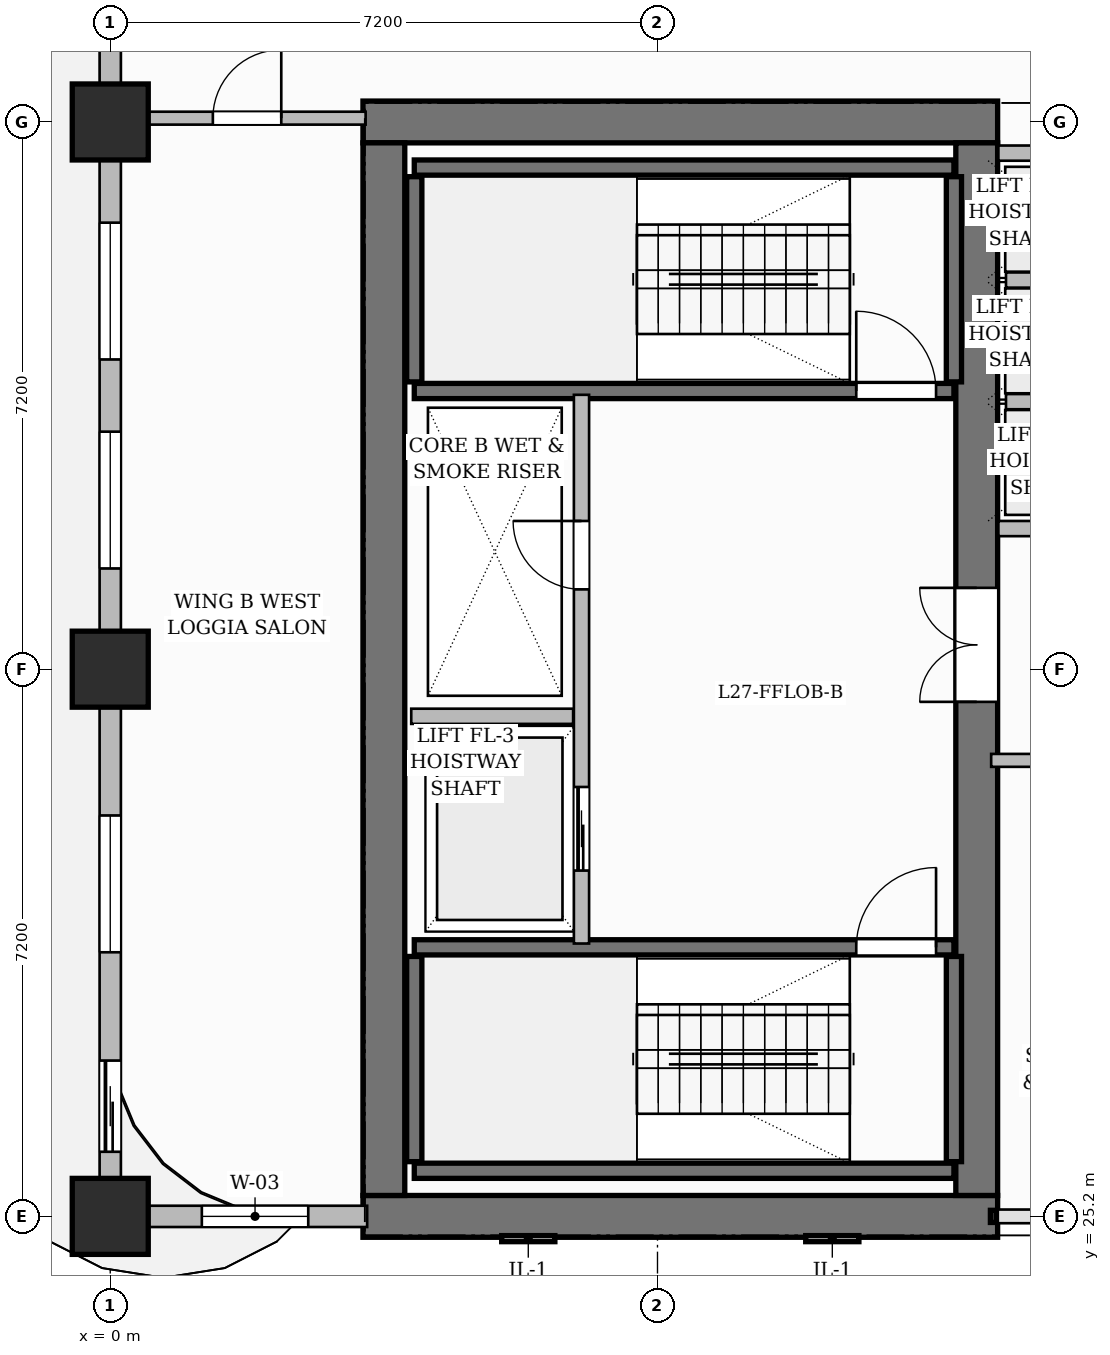
"""IFC4 building model, lengths in metres.
Left out: names, types, materials, properties, quantities, classifications, styles, units other than length and angle.
Written with IfcOpenShell. Run it as: python <this file> out.ifc"""

import sys

from ifc_helpers import new_model, si_unit, direction, frame, frame_2d, origin, origin_2d, place, context, subcontext, project, spatial, rectangle, extrude, source, transform, mapped, element, fill, save


model = new_model("IFC4")
c1 = context("Model", 3, precision=1e-05, world=origin(), true_north=direction((0.0, 1.0)))
c2 = subcontext(c1, "Body", "Model", "MODEL_VIEW")
j1 = project(units=[si_unit("LENGTHUNIT", "METRE"), si_unit("PLANEANGLEUNIT", "RADIAN")], contexts=[c1])
p1 = place(None, origin())
s1 = spatial("IfcSite", under=j1, at=p1, CompositionType="ELEMENT")
p2 = place(p1, origin())
s2 = spatial("IfcBuilding", under=s1, at=p2, CompositionType="ELEMENT")
p3 = place(p2, frame((0.0, 0.0, 111.8)))
s3 = spatial("IfcBuildingStorey", under=s2, at=p3, CompositionType="ELEMENT", Elevation=111.8)
for number, where, z_axis, x_axis in (
    (1, (3.325, 25.2, 0.0), (0.0, 0.0, 1.0), (1.0, 0.0, 0.0)),
    (2, (3.325, 39.6, 0.0), (0.0, 0.0, 1.0), (1.0, 0.0, 0.0)),
):
    element("IfcWall", number, at=place(p3, frame(where, z_axis=z_axis, x_axis=x_axis)), inside=s3, PredefinedType="SHEAR", context=c2, shape_type="SweptSolid", body=[
        extrude(rectangle(XDim=8.35, YDim=0.55, at=frame_2d((4.175, 0.0))), origin(), (0.0, 0.0, 1.0), 3.7),
    ])
p4 = place(p3, frame((3.6, 25.475, 0.0), z_axis=(0.0, 0.0, 1.0), x_axis=(0.0, 1.0, 0.0)))
e3 = element("IfcWall", 3, at=p4, inside=s3, PredefinedType="SHEAR", context=c2, shape_type="SweptSolid", body=[
    extrude(rectangle(XDim=13.85, YDim=0.55, at=frame_2d((6.925, 0.0))), origin(), (0.0, 0.0, 1.0), 3.7),
])
p5 = place(p3, frame((11.4, 25.475, 0.0), z_axis=(0.0, 0.0, 1.0), x_axis=(0.0, 1.0, 0.0)))
e4 = element("IfcWall", 4, at=p5, inside=s3, PredefinedType="SHEAR", context=c2, shape_type="SweptSolid", body=[
    extrude(rectangle(XDim=13.85, YDim=0.55, at=frame_2d((6.925, 0.0))), origin(), (0.0, 0.0, 1.0), 3.7),
])
p6 = place(p5, frame((6.495, 0.0, 0.0)))
e5 = element("IfcOpeningElement", 5, at=p6, cuts=e4, PredefinedType="OPENING", context=c2, shape_type="SweptSolid", body=[
    extrude(rectangle(XDim=1.5, YDim=2.2, at=frame_2d((0.75, 1.1))), frame((0.0, 0.285, 0.0), z_axis=(0.0, -1.0, 0.0), x_axis=(1.0, 0.0, 0.0)), (0.0, 0.0, 1.0), 0.57),
])
m1 = source(origin(), c2, "Body", "SweptSolid", [
    extrude(rectangle(XDim=1.0, YDim=1.0, at=origin_2d()), origin(), (0.0, 0.0, 1.0), 3.7),
])
for number, where, z_axis, x_axis in (
    (6, (0.0, 25.2, 0.0), (0.0, 0.0, 1.0), (1.0, 0.0, 0.0)),
    (7, (0.0, 32.4, 0.0), (0.0, 0.0, 1.0), (1.0, 0.0, 0.0)),
    (8, (0.0, 39.6, 0.0), (0.0, 0.0, 1.0), (1.0, 0.0, 0.0)),
):
    element("IfcColumn", number, at=place(p3, frame(where, z_axis=z_axis, x_axis=x_axis)), inside=s3, PredefinedType="COLUMN", context=c2, shape_type="MappedRepresentation", body=[
        mapped(m1, transform((0.0, 0.0, 0.0), scale=1.0)),
    ])
p7 = place(p3, frame((4.0, 25.8, 0.0), z_axis=(0.0, 0.0, 1.0), x_axis=(1.0, 0.0, 0.0)))
e9 = element("IfcWall", 9, at=p7, inside=s3, PredefinedType="SHEAR", context=c2, shape_type="SweptSolid", body=[
    extrude(rectangle(XDim=7.1, YDim=0.2, at=frame_2d((3.55, 0.0))), origin(), (0.0, 0.0, 1.0), 3.7),
])
for number, where, z_axis, x_axis in (
    (10, (4.0, 25.92, 0.0), (0.0, 0.0, 1.0), (0.0, 1.0, 0.0)),
    (11, (11.1, 25.92, 0.0), (0.0, 0.0, 1.0), (0.0, 1.0, 0.0)),
):
    element("IfcWall", number, at=place(p3, frame(where, z_axis=z_axis, x_axis=x_axis)), inside=s3, PredefinedType="SHEAR", context=c2, shape_type="SweptSolid", body=[
        extrude(rectangle(XDim=2.7, YDim=0.2, at=frame_2d((1.35, 0.0))), origin(), (0.0, 0.0, 1.0), 3.7),
    ])
p8 = place(p3, frame((4.0, 28.74, 0.0), z_axis=(0.0, 0.0, 1.0), x_axis=(1.0, 0.0, 0.0)))
e12 = element("IfcWall", 12, at=p8, inside=s3, PredefinedType="SHEAR", context=c2, shape_type="SweptSolid", body=[
    extrude(rectangle(XDim=7.1, YDim=0.2, at=frame_2d((3.55, 0.0))), origin(), (0.0, 0.0, 1.0), 3.7),
])
p9 = place(p8, frame((5.815, 0.0, 0.0)))
e13 = element("IfcOpeningElement", 13, at=p9, cuts=e12, PredefinedType="OPENING", context=c2, shape_type="SweptSolid", body=[
    extrude(rectangle(XDim=1.05, YDim=2.2, at=frame_2d((0.525, 1.1))), frame((0.0, 0.11, 0.0), z_axis=(0.0, -1.0, 0.0), x_axis=(1.0, 0.0, 0.0)), (0.0, 0.0, 1.0), 0.22),
])
p10 = place(p3, frame((4.0, 39.0, 0.0), z_axis=(0.0, 0.0, 1.0), x_axis=(1.0, 0.0, 0.0)))
e14 = element("IfcWall", 14, at=p10, inside=s3, PredefinedType="SHEAR", context=c2, shape_type="SweptSolid", body=[
    extrude(rectangle(XDim=7.1, YDim=0.2, at=frame_2d((3.55, 0.0))), origin(), (0.0, 0.0, 1.0), 3.7),
])
for number, where, z_axis, x_axis in (
    (15, (4.0, 36.18, 0.0), (0.0, 0.0, 1.0), (0.0, 1.0, 0.0)),
    (16, (11.1, 36.18, 0.0), (0.0, 0.0, 1.0), (0.0, 1.0, 0.0)),
):
    element("IfcWall", number, at=place(p3, frame(where, z_axis=z_axis, x_axis=x_axis)), inside=s3, PredefinedType="SHEAR", context=c2, shape_type="SweptSolid", body=[
        extrude(rectangle(XDim=2.7, YDim=0.2, at=frame_2d((1.35, 0.0))), origin(), (0.0, 0.0, 1.0), 3.7),
    ])
p11 = place(p3, frame((4.0, 36.06, 0.0), z_axis=(0.0, 0.0, 1.0), x_axis=(1.0, 0.0, 0.0)))
e17 = element("IfcWall", 17, at=p11, inside=s3, PredefinedType="SHEAR", context=c2, shape_type="SweptSolid", body=[
    extrude(rectangle(XDim=7.1, YDim=0.2, at=frame_2d((3.55, 0.0))), origin(), (0.0, 0.0, 1.0), 3.7),
])
p12 = place(p11, frame((5.815, 0.0, 0.0)))
e18 = element("IfcOpeningElement", 18, at=p12, cuts=e17, PredefinedType="OPENING", context=c2, shape_type="SweptSolid", body=[
    extrude(rectangle(XDim=1.05, YDim=2.2, at=frame_2d((0.525, 1.1))), frame((0.0, 0.11, 0.0), z_axis=(0.0, -1.0, 0.0), x_axis=(1.0, 0.0, 0.0)), (0.0, 0.0, 1.0), 0.22),
])
p13 = place(p3, frame((6.2, 28.79, 0.0), z_axis=(0.0, 0.0, 1.0), x_axis=(0.0, 1.0, 0.0)))
e19 = element("IfcWall", 19, at=p13, inside=s3, PredefinedType="PARTITIONING", context=c2, shape_type="SweptSolid", body=[
    extrude(rectangle(XDim=7.22, YDim=0.2, at=frame_2d((3.61, 0.0))), origin(), (0.0, 0.0, 1.0), 3.45),
])
p14 = place(p13, frame((4.66, 0.0, 0.0)))
e20 = element("IfcOpeningElement", 20, at=p14, cuts=e19, PredefinedType="OPENING", context=c2, shape_type="SweptSolid", body=[
    extrude(rectangle(XDim=0.9, YDim=2.1, at=frame_2d((0.45, 1.05))), frame((0.0, 0.11, 0.0), z_axis=(0.0, -1.0, 0.0), x_axis=(1.0, 0.0, 0.0)), (0.0, 0.0, 1.0), 0.22),
])
p15 = place(p13, frame((0.96, 0.0, 0.0)))
e21 = element("IfcOpeningElement", 21, at=p15, cuts=e19, PredefinedType="OPENING", context=c2, shape_type="SweptSolid", body=[
    extrude(rectangle(XDim=1.1, YDim=2.2, at=frame_2d((0.55, 1.1))), frame((0.0, 0.11, 0.0), z_axis=(0.0, -1.0, 0.0), x_axis=(1.0, 0.0, 0.0)), (0.0, 0.0, 1.0), 0.22),
])
p16 = place(p3, frame((3.96, 31.78, 0.0), z_axis=(0.0, 0.0, 1.0), x_axis=(1.0, 0.0, 0.0)))
e22 = element("IfcWall", 22, at=p16, inside=s3, PredefinedType="PARTITIONING", context=c2, shape_type="SweptSolid", body=[
    extrude(rectangle(XDim=2.13, YDim=0.2, at=frame_2d((1.065, 0.0))), origin(), (0.0, 0.0, 1.0), 3.45),
])
for number, where, z_axis, x_axis in (
    (23, (11.685, 34.25, 0.0), (0.0, 0.0, 1.0), (1.0, 0.0, 0.0)),
    (24, (11.685, 39.19, 0.0), (0.0, 0.0, 1.0), (1.0, 0.0, 0.0)),
):
    element("IfcWall", number, at=place(p3, frame(where, z_axis=z_axis, x_axis=x_axis)), inside=s3, PredefinedType="PARTITIONING", context=c2, shape_type="SweptSolid", body=[
        extrude(rectangle(XDim=1.985, YDim=0.2, at=frame_2d((0.992, 0.0))), origin(), (0.0, 0.0, 1.0), 3.45),
    ])
for number, where, z_axis, x_axis in (
    (25, (11.785, 35.92, 0.0), (0.0, 0.0, 1.0), (1.0, 0.0, 0.0)),
    (26, (11.785, 37.52, 0.0), (0.0, 0.0, 1.0), (1.0, 0.0, 0.0)),
):
    element("IfcWall", number, at=place(p3, frame(where, z_axis=z_axis, x_axis=x_axis)), inside=s3, PredefinedType="PARTITIONING", context=c2, shape_type="SweptSolid", body=[
        extrude(rectangle(XDim=1.785, YDim=0.2, at=frame_2d((0.893, 0.0))), origin(), (0.0, 0.0, 1.0), 3.45),
    ])
p17 = place(p3, frame((0.24, 39.65, 0.0), z_axis=(0.0, 0.0, 1.0), x_axis=(1.0, 0.0, 0.0)))
e27 = element("IfcWall", 27, at=p17, inside=s3, PredefinedType="PARTITIONING", context=c2, shape_type="SweptSolid", body=[
    extrude(rectangle(XDim=3.12, YDim=0.17, at=frame_2d((1.56, 0.0))), origin(), (0.0, 0.0, 1.0), 3.45),
])
p18 = place(p17, frame((1.11, 0.0, 0.0)))
e28 = element("IfcOpeningElement", 28, at=p18, cuts=e27, PredefinedType="OPENING", context=c2, shape_type="SweptSolid", body=[
    extrude(rectangle(XDim=0.9, YDim=2.15, at=frame_2d((0.45, 1.075))), frame((0.0, 0.095, 0.0), z_axis=(0.0, -1.0, 0.0), x_axis=(1.0, 0.0, 0.0)), (0.0, 0.0, 1.0), 0.19),
])
p19 = place(p3, frame((11.59, 31.2, 0.0), z_axis=(0.0, 0.0, 1.0), x_axis=(1.0, 0.0, 0.0)))
e29 = element("IfcWall", 29, at=p19, inside=s3, PredefinedType="PARTITIONING", context=c2, shape_type="SweptSolid", body=[
    extrude(rectangle(XDim=3.37, YDim=0.17, at=frame_2d((1.685, 0.0))), origin(), (0.0, 0.0, 1.0), 3.45),
])
p20 = place(p19, frame((1.185, 0.0, 0.0)))
e30 = element("IfcOpeningElement", 30, at=p20, cuts=e29, PredefinedType="OPENING", context=c2, shape_type="SweptSolid", body=[
    extrude(rectangle(XDim=0.95, YDim=2.15, at=frame_2d((0.475, 1.075))), frame((0.0, 0.095, 0.0), z_axis=(0.0, -1.0, 0.0), x_axis=(1.0, 0.0, 0.0)), (0.0, 0.0, 1.0), 0.19),
])
p21 = place(p3, frame((0.0, 25.2, 0.0), z_axis=(0.0, 0.0, 1.0), x_axis=(1.0, 0.0, 0.0)))
e31 = element("IfcWall", 31, at=p21, inside=s3, PredefinedType="SOLIDWALL", context=c2, shape_type="SweptSolid", body=[
    extrude(rectangle(XDim=3.38, YDim=0.28, at=frame_2d((1.69, 0.0))), origin(), (0.0, 0.0, 1.0), 3.45),
])
p22 = place(p21, frame((1.205, 0.0, 0.8)))
e32 = element("IfcOpeningElement", 32, at=p22, cuts=e31, PredefinedType="OPENING", context=c2, shape_type="SweptSolid", body=[
    extrude(rectangle(XDim=1.4, YDim=1.85, at=frame_2d((0.7, 0.925))), frame((0.0, 0.15, 0.0), z_axis=(0.0, -1.0, 0.0), x_axis=(1.0, 0.0, 0.0)), (0.0, 0.0, 1.0), 0.3),
])
p23 = place(p3, frame((0.0, 25.25, 0.0), z_axis=(0.0, 0.0, 1.0), x_axis=(0.0, 1.0, 0.0)))
e33 = element("IfcWall", 33, at=p23, inside=s3, PredefinedType="SOLIDWALL", context=c2, shape_type="SweptSolid", body=[
    extrude(rectangle(XDim=21.5, YDim=0.28, at=frame_2d((10.75, 0.0))), origin(), (0.0, 0.0, 1.0), 2.935),
])
p24 = place(p23, frame((18.357, 0.0, 0.0)))
e34 = element("IfcOpeningElement", 34, at=p24, cuts=e33, PredefinedType="OPENING", context=c2, shape_type="SweptSolid", body=[
    extrude(rectangle(XDim=1.2, YDim=2.2, at=frame_2d((0.6, 1.1))), frame((0.0, 0.15, 0.0), z_axis=(0.0, -1.0, 0.0), x_axis=(1.0, 0.0, 0.0)), (0.0, 0.0, 1.0), 0.3),
])
p25 = place(p23, frame((0.8, 0.0, 0.0)))
e35 = element("IfcOpeningElement", 35, at=p25, cuts=e33, PredefinedType="OPENING", context=c2, shape_type="SweptSolid", body=[
    extrude(rectangle(XDim=1.2, YDim=2.2, at=frame_2d((0.6, 1.1))), frame((0.0, 0.15, 0.0), z_axis=(0.0, -1.0, 0.0), x_axis=(1.0, 0.0, 0.0)), (0.0, 0.0, 1.0), 0.3),
])
p26 = place(p23, frame((3.425, 0.0, 0.8)))
e36 = element("IfcOpeningElement", 36, at=p26, cuts=e33, PredefinedType="OPENING", context=c2, shape_type="SweptSolid", body=[
    extrude(rectangle(XDim=1.8, YDim=1.85, at=frame_2d((0.9, 0.925))), frame((0.0, 0.15, 0.0), z_axis=(0.0, -1.0, 0.0), x_axis=(1.0, 0.0, 0.0)), (0.0, 0.0, 1.0), 0.3),
])
p27 = place(p23, frame((8.475, 0.0, 0.8)))
e37 = element("IfcOpeningElement", 37, at=p27, cuts=e33, PredefinedType="OPENING", context=c2, shape_type="SweptSolid", body=[
    extrude(rectangle(XDim=1.8, YDim=1.85, at=frame_2d((0.9, 0.925))), frame((0.0, 0.15, 0.0), z_axis=(0.0, -1.0, 0.0), x_axis=(1.0, 0.0, 0.0)), (0.0, 0.0, 1.0), 0.3),
])
p28 = place(p23, frame((11.225, 0.0, 0.8)))
e38 = element("IfcOpeningElement", 38, at=p28, cuts=e33, PredefinedType="OPENING", context=c2, shape_type="SweptSolid", body=[
    extrude(rectangle(XDim=1.8, YDim=1.85, at=frame_2d((0.9, 0.925))), frame((0.0, 0.15, 0.0), z_axis=(0.0, -1.0, 0.0), x_axis=(1.0, 0.0, 0.0)), (0.0, 0.0, 1.0), 0.3),
])
p29 = place(p23, frame((16.632, 0.0, 0.8)))
e39 = element("IfcOpeningElement", 39, at=p29, cuts=e33, PredefinedType="OPENING", context=c2, shape_type="SweptSolid", body=[
    extrude(rectangle(XDim=1.15, YDim=1.8, at=frame_2d((0.575, 0.9))), frame((0.0, 0.15, 0.0), z_axis=(0.0, -1.0, 0.0), x_axis=(1.0, 0.0, 0.0)), (0.0, 0.0, 1.0), 0.3),
])
m2 = source(origin(), c2, "Body", "SweptSolid", [
    extrude(rectangle(XDim=1.05, YDim=2.2, at=frame_2d((0.525, 1.1))), frame((0.0, 0.025, 0.0), z_axis=(0.0, -1.0, 0.0), x_axis=(1.0, 0.0, 0.0)), (0.0, 0.0, 1.0), 0.05),
])
p30 = place(p9, origin())
e40 = element("IfcDoor", 40, at=p30, inside=s3, OperationType="SINGLE_SWING_RIGHT", PredefinedType="DOOR", context=c2, shape_type="MappedRepresentation", body=[
    mapped(m2, transform((0.0, 0.0, 0.0), scale=1.0)),
])
fill(e13, e40)
p31 = place(p12, origin())
e41 = element("IfcDoor", 41, at=p31, inside=s3, OperationType="SINGLE_SWING_LEFT", PredefinedType="DOOR", context=c2, shape_type="MappedRepresentation", body=[
    mapped(m2, transform((0.0, 0.0, 0.0), scale=1.0)),
])
fill(e18, e41)
m3 = source(origin(), c2, "Body", "SweptSolid", [
    extrude(rectangle(XDim=0.9, YDim=2.1, at=frame_2d((0.45, 1.05))), frame((0.0, 0.025, 0.0), z_axis=(0.0, -1.0, 0.0), x_axis=(1.0, 0.0, 0.0)), (0.0, 0.0, 1.0), 0.05),
])
p32 = place(p14, origin())
e42 = element("IfcDoor", 42, at=p32, inside=s3, OperationType="SINGLE_SWING_RIGHT", PredefinedType="DOOR", context=c2, shape_type="MappedRepresentation", body=[
    mapped(m3, transform((0.0, 0.0, 0.0), scale=1.0)),
])
fill(e20, e42)
m4 = source(origin(), c2, "Body", "SweptSolid", [
    extrude(rectangle(XDim=1.5, YDim=2.2, at=frame_2d((0.75, 1.1))), frame((0.0, 0.025, 0.0), z_axis=(0.0, -1.0, 0.0), x_axis=(1.0, 0.0, 0.0)), (0.0, 0.0, 1.0), 0.05),
])
p33 = place(p6, origin())
e43 = element("IfcDoor", 43, at=p33, inside=s3, OperationType="DOUBLE_DOOR_SINGLE_SWING", PredefinedType="DOOR", context=c2, shape_type="MappedRepresentation", body=[
    mapped(m4, transform((0.0, 0.0, 0.0), scale=1.0)),
])
fill(e5, e43)
m5 = source(origin(), c2, "Body", "SweptSolid", [
    extrude(rectangle(XDim=0.9, YDim=2.15, at=frame_2d((0.45, 1.075))), frame((0.0, 0.025, 0.0), z_axis=(0.0, -1.0, 0.0), x_axis=(1.0, 0.0, 0.0)), (0.0, 0.0, 1.0), 0.05),
])
p34 = place(p18, origin())
e44 = element("IfcDoor", 44, at=p34, inside=s3, OperationType="SINGLE_SWING_RIGHT", PredefinedType="DOOR", context=c2, shape_type="MappedRepresentation", body=[
    mapped(m5, transform((0.0, 0.0, 0.0), scale=1.0)),
])
fill(e28, e44)
m6 = source(origin(), c2, "Body", "SweptSolid", [
    extrude(rectangle(XDim=1.1, YDim=2.2, at=frame_2d((0.55, 1.1))), frame((0.0, 0.025, 0.0), z_axis=(0.0, -1.0, 0.0), x_axis=(1.0, 0.0, 0.0)), (0.0, 0.0, 1.0), 0.05),
])
p35 = place(p15, origin())
e45 = element("IfcDoor", 45, at=p35, inside=s3, OperationType="SLIDING_TO_LEFT", PredefinedType="DOOR", context=c2, shape_type="MappedRepresentation", body=[
    mapped(m6, transform((0.0, 0.0, 0.0), scale=1.0)),
])
fill(e21, e45)
m7 = source(origin(), c2, "Body", "SweptSolid", [
    extrude(rectangle(XDim=1.2, YDim=2.2, at=frame_2d((0.6, 1.1))), frame((0.0, 0.025, 0.0), z_axis=(0.0, -1.0, 0.0), x_axis=(1.0, 0.0, 0.0)), (0.0, 0.0, 1.0), 0.05),
])
p36 = place(p25, origin())
e46 = element("IfcDoor", 46, at=p36, inside=s3, OperationType="SLIDING_TO_LEFT", PredefinedType="DOOR", context=c2, shape_type="MappedRepresentation", body=[
    mapped(m7, transform((0.0, 0.0, 0.0), scale=1.0)),
])
fill(e35, e46)
m8 = source(origin(), c2, "Body", "SweptSolid", [
    extrude(rectangle(XDim=1.4, YDim=1.85, at=frame_2d((0.7, 0.925))), frame((0.0, 0.03, 0.0), z_axis=(0.0, -1.0, 0.0), x_axis=(1.0, 0.0, 0.0)), (0.0, 0.0, 1.0), 0.06),
])
p37 = place(p22, origin())
e47 = element("IfcWindow", 47, at=p37, inside=s3, PartitioningType="SINGLE_PANEL", PredefinedType="WINDOW", context=c2, shape_type="MappedRepresentation", body=[
    mapped(m8, transform((0.0, 0.0, 0.0), scale=1.0)),
])
fill(e32, e47)
m9 = source(origin(), c2, "Body", "SweptSolid", [
    extrude(rectangle(XDim=1.8, YDim=1.85, at=frame_2d((0.9, 0.925))), frame((0.0, 0.03, 0.0), z_axis=(0.0, -1.0, 0.0), x_axis=(1.0, 0.0, 0.0)), (0.0, 0.0, 1.0), 0.06),
])
p38 = place(p26, origin())
e48 = element("IfcWindow", 48, at=p38, inside=s3, PartitioningType="DOUBLE_PANEL_VERTICAL", PredefinedType="WINDOW", context=c2, shape_type="MappedRepresentation", body=[
    mapped(m9, transform((0.0, 0.0, 0.0), scale=1.0)),
])
fill(e36, e48)
p39 = place(p27, origin())
e49 = element("IfcWindow", 49, at=p39, inside=s3, PartitioningType="DOUBLE_PANEL_VERTICAL", PredefinedType="WINDOW", context=c2, shape_type="MappedRepresentation", body=[
    mapped(m9, transform((0.0, 0.0, 0.0), scale=1.0)),
])
fill(e37, e49)
p40 = place(p28, origin())
e50 = element("IfcWindow", 50, at=p40, inside=s3, PartitioningType="DOUBLE_PANEL_VERTICAL", PredefinedType="WINDOW", context=c2, shape_type="MappedRepresentation", body=[
    mapped(m9, transform((0.0, 0.0, 0.0), scale=1.0)),
])
fill(e38, e50)
save(model, sys.argv[1])
